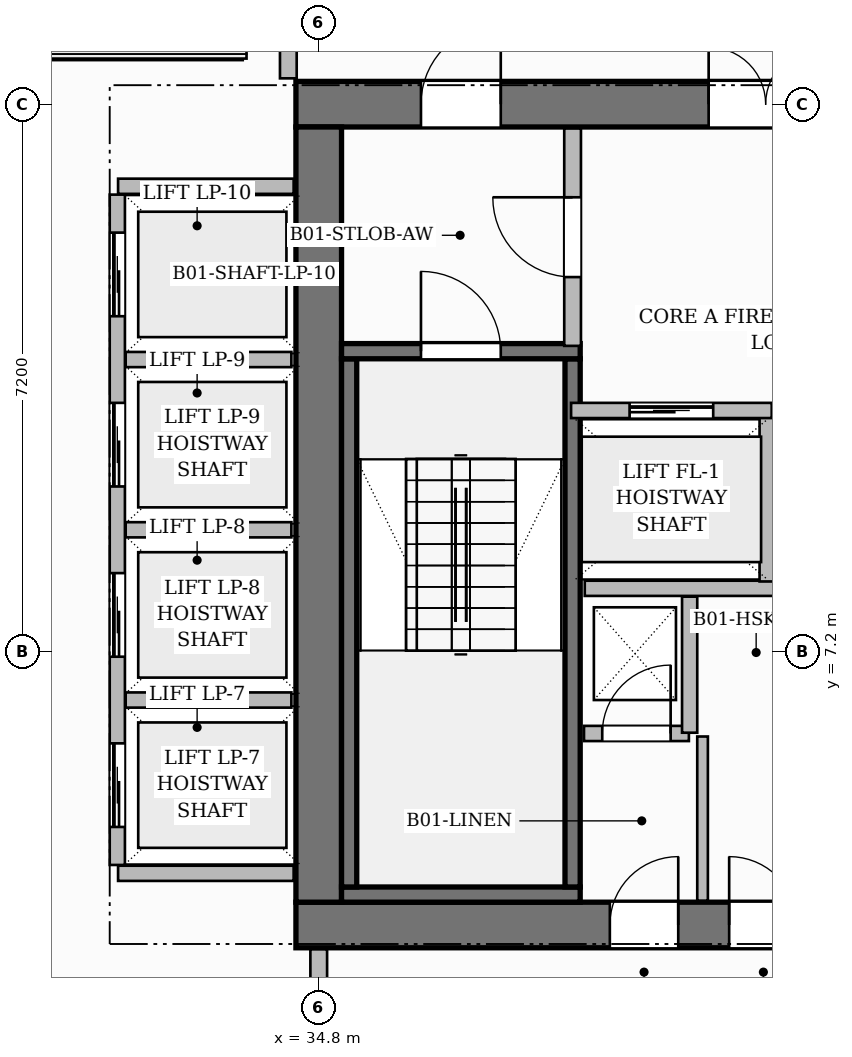
"""IFC4 building model, lengths in metres.
Left out: names, types, materials, properties, quantities, classifications, styles, units other than length and angle.
Written with IfcOpenShell. Run it as: python <this file> out.ifc"""

import sys

from ifc_helpers import new_model, si_unit, direction, frame, frame_2d, origin, place, context, subcontext, project, spatial, rectangle, extrude, source, transform, mapped, element, fill, save


model = new_model("IFC4")
c1 = context("Model", 3, precision=1e-05, world=origin(), true_north=direction((0.0, 1.0)))
c2 = subcontext(c1, "Body", "Model", "MODEL_VIEW")
j1 = project(units=[si_unit("LENGTHUNIT", "METRE"), si_unit("PLANEANGLEUNIT", "RADIAN")], contexts=[c1])
p1 = place(None, origin())
s1 = spatial("IfcSite", under=j1, at=p1, CompositionType="ELEMENT")
p2 = place(p1, origin())
s2 = spatial("IfcBuilding", under=s1, at=p2, CompositionType="ELEMENT")
p3 = place(p2, frame((0.0, 0.0, -6.5)))
s3 = spatial("IfcBuildingStorey", under=s2, at=p3, CompositionType="ELEMENT", Elevation=-6.5)
p4 = place(p3, frame((34.5, 3.6, 0.0), z_axis=(0.0, 0.0, 1.0), x_axis=(1.0, 0.0, 0.0)))
e1 = element("IfcWall", 1, at=p4, inside=s3, PredefinedType="SHEAR", context=c2, shape_type="SweptSolid", body=[
    extrude(rectangle(XDim=15.6, YDim=0.6, at=frame_2d((7.8, 0.0))), origin(), (0.0, 0.0, 1.0), 6.5),
])
p5 = place(p4, frame((4.13, 0.0, 0.0)))
e2 = element("IfcOpeningElement", 2, at=p5, cuts=e1, PredefinedType="OPENING", context=c2, shape_type="SweptSolid", body=[
    extrude(rectangle(XDim=0.9, YDim=2.1, at=frame_2d((0.45, 1.05))), frame((0.0, 0.31, 0.0), z_axis=(0.0, -1.0, 0.0), x_axis=(1.0, 0.0, 0.0)), (0.0, 0.0, 1.0), 0.62),
])
p6 = place(p4, frame((5.7, 0.0, 0.0)))
e3 = element("IfcOpeningElement", 3, at=p6, cuts=e1, PredefinedType="OPENING", context=c2, shape_type="SweptSolid", body=[
    extrude(rectangle(XDim=0.9, YDim=2.1, at=frame_2d((0.45, 1.05))), frame((0.0, 0.31, 0.0), z_axis=(0.0, -1.0, 0.0), x_axis=(1.0, 0.0, 0.0)), (0.0, 0.0, 1.0), 0.62),
])
p7 = place(p4, frame((7.3, 0.0, 0.0)))
e4 = element("IfcOpeningElement", 4, at=p7, cuts=e1, PredefinedType="OPENING", context=c2, shape_type="SweptSolid", body=[
    extrude(rectangle(XDim=0.9, YDim=2.1, at=frame_2d((0.45, 1.05))), frame((0.0, 0.31, 0.0), z_axis=(0.0, -1.0, 0.0), x_axis=(1.0, 0.0, 0.0)), (0.0, 0.0, 1.0), 0.62),
])
p8 = place(p3, frame((34.5, 14.4, 0.0), z_axis=(0.0, 0.0, 1.0), x_axis=(1.0, 0.0, 0.0)))
e5 = element("IfcWall", 5, at=p8, inside=s3, PredefinedType="SHEAR", context=c2, shape_type="SweptSolid", body=[
    extrude(rectangle(XDim=15.6, YDim=0.6, at=frame_2d((7.8, 0.0))), origin(), (0.0, 0.0, 1.0), 6.5),
])
p9 = place(p8, frame((5.43, 0.0, 0.0)))
e6 = element("IfcOpeningElement", 6, at=p9, cuts=e5, PredefinedType="OPENING", context=c2, shape_type="SweptSolid", body=[
    extrude(rectangle(XDim=1.5, YDim=2.2, at=frame_2d((0.75, 1.1))), frame((0.0, 0.31, 0.0), z_axis=(0.0, -1.0, 0.0), x_axis=(1.0, 0.0, 0.0)), (0.0, 0.0, 1.0), 0.62),
])
p10 = place(p8, frame((1.645, 0.0, 0.0)))
e7 = element("IfcOpeningElement", 7, at=p10, cuts=e5, PredefinedType="OPENING", context=c2, shape_type="SweptSolid", body=[
    extrude(rectangle(XDim=1.05, YDim=2.15, at=frame_2d((0.525, 1.075))), frame((0.0, 0.31, 0.0), z_axis=(0.0, -1.0, 0.0), x_axis=(1.0, 0.0, 0.0)), (0.0, 0.0, 1.0), 0.62),
])
p11 = place(p8, frame((11.275, 0.0, 0.0)))
e8 = element("IfcOpeningElement", 8, at=p11, cuts=e5, PredefinedType="OPENING", context=c2, shape_type="SweptSolid", body=[
    extrude(rectangle(XDim=1.05, YDim=2.15, at=frame_2d((0.525, 1.075))), frame((0.0, 0.31, 0.0), z_axis=(0.0, -1.0, 0.0), x_axis=(1.0, 0.0, 0.0)), (0.0, 0.0, 1.0), 0.62),
])
p12 = place(p3, frame((34.8, 3.9, 0.0), z_axis=(0.0, 0.0, 1.0), x_axis=(0.0, 1.0, 0.0)))
e9 = element("IfcWall", 9, at=p12, inside=s3, PredefinedType="SHEAR", context=c2, shape_type="SweptSolid", body=[
    extrude(rectangle(XDim=10.2, YDim=0.6, at=frame_2d((5.1, 0.0))), origin(), (0.0, 0.0, 1.0), 6.5),
])
p13 = place(p3, frame((35.1, 4.0, 0.0), z_axis=(0.0, 0.0, 1.0), x_axis=(1.0, 0.0, 0.0)))
e10 = element("IfcWall", 10, at=p13, inside=s3, PredefinedType="SHEAR", context=c2, shape_type="SweptSolid", body=[
    extrude(rectangle(XDim=3.14, YDim=0.2, at=frame_2d((1.57, 0.0))), origin(), (0.0, 0.0, 1.0), 6.5),
])
for number, where, z_axis, x_axis in (
    (11, (35.2, 4.1, 0.0), (0.0, 0.0, 1.0), (0.0, 1.0, 0.0)),
    (12, (38.14, 4.1, 0.0), (0.0, 0.0, 1.0), (0.0, 1.0, 0.0)),
):
    element("IfcWall", number, at=place(p3, frame(where, z_axis=z_axis, x_axis=x_axis)), inside=s3, PredefinedType="SHEAR", context=c2, shape_type="SweptSolid", body=[
        extrude(rectangle(XDim=6.95, YDim=0.2, at=frame_2d((3.475, 0.0))), origin(), (0.0, 0.0, 1.0), 6.5),
    ])
p14 = place(p3, frame((35.1, 11.15, 0.0), z_axis=(0.0, 0.0, 1.0), x_axis=(1.0, 0.0, 0.0)))
e13 = element("IfcWall", 13, at=p14, inside=s3, PredefinedType="SHEAR", context=c2, shape_type="SweptSolid", body=[
    extrude(rectangle(XDim=3.14, YDim=0.2, at=frame_2d((1.57, 0.0))), origin(), (0.0, 0.0, 1.0), 6.5),
])
p15 = place(p14, frame((1.045, 0.0, 0.0)))
e14 = element("IfcOpeningElement", 14, at=p15, cuts=e13, PredefinedType="OPENING", context=c2, shape_type="SweptSolid", body=[
    extrude(rectangle(XDim=1.05, YDim=2.2, at=frame_2d((0.525, 1.1))), frame((0.0, 0.11, 0.0), z_axis=(0.0, -1.0, 0.0), x_axis=(1.0, 0.0, 0.0)), (0.0, 0.0, 1.0), 0.22),
])
p16 = place(p3, frame((38.3, 8.03, 0.0), z_axis=(0.0, 0.0, 1.0), x_axis=(1.0, 0.0, 0.0)))
e15 = element("IfcWall", 15, at=p16, inside=s3, PredefinedType="PARTITIONING", context=c2, shape_type="SweptSolid", body=[
    extrude(rectangle(XDim=4.74, YDim=0.2, at=frame_2d((2.37, 0.0))), origin(), (0.0, 0.0, 1.0), 6.1),
])
p17 = place(p3, frame((40.7, 8.12, 0.0), z_axis=(0.0, 0.0, 1.0), x_axis=(0.0, 1.0, 0.0)))
e16 = element("IfcWall", 16, at=p17, inside=s3, PredefinedType="PARTITIONING", context=c2, shape_type="SweptSolid", body=[
    extrude(rectangle(XDim=2.18, YDim=0.2, at=frame_2d((1.09, 0.0))), origin(), (0.0, 0.0, 1.0), 6.1),
])
p18 = place(p3, frame((38.14, 11.22, 0.0), z_axis=(0.0, 0.0, 1.0), x_axis=(0.0, 1.0, 0.0)))
e17 = element("IfcWall", 17, at=p18, inside=s3, PredefinedType="PARTITIONING", context=c2, shape_type="SweptSolid", body=[
    extrude(rectangle(XDim=2.86, YDim=0.22, at=frame_2d((1.43, 0.0))), origin(), (0.0, 0.0, 1.0), 6.1),
])
p19 = place(p18, frame((0.905, 0.0, 0.0)))
e18 = element("IfcOpeningElement", 18, at=p19, cuts=e17, PredefinedType="OPENING", context=c2, shape_type="SweptSolid", body=[
    extrude(rectangle(XDim=1.05, YDim=2.15, at=frame_2d((0.525, 1.075))), frame((0.0, 0.12, 0.0), z_axis=(0.0, -1.0, 0.0), x_axis=(1.0, 0.0, 0.0)), (0.0, 0.0, 1.0), 0.24),
])
p20 = place(p3, frame((38.29, 6.12, 0.0), z_axis=(0.0, 0.0, 1.0), x_axis=(1.0, 0.0, 0.0)))
e19 = element("IfcWall", 19, at=p20, inside=s3, PredefinedType="PARTITIONING", context=c2, shape_type="SweptSolid", body=[
    extrude(rectangle(XDim=1.38, YDim=0.2, at=frame_2d((0.69, 0.0))), origin(), (0.0, 0.0, 1.0), 6.1),
])
p21 = place(p20, frame((0.24, 0.0, 0.0)))
e20 = element("IfcOpeningElement", 20, at=p21, cuts=e19, PredefinedType="OPENING", context=c2, shape_type="SweptSolid", body=[
    extrude(rectangle(XDim=0.9, YDim=2.1, at=frame_2d((0.45, 1.05))), frame((0.0, 0.11, 0.0), z_axis=(0.0, -1.0, 0.0), x_axis=(1.0, 0.0, 0.0)), (0.0, 0.0, 1.0), 0.22),
])
p22 = place(p3, frame((39.68, 6.13, 0.0), z_axis=(0.0, 0.0, 1.0), x_axis=(0.0, 1.0, 0.0)))
e21 = element("IfcWall", 21, at=p22, inside=s3, PredefinedType="PARTITIONING", context=c2, shape_type="SweptSolid", body=[
    extrude(rectangle(XDim=1.79, YDim=0.2, at=frame_2d((0.895, 0.0))), origin(), (0.0, 0.0, 1.0), 6.1),
])
p23 = place(p3, frame((39.85, 3.92, 0.0), z_axis=(0.0, 0.0, 1.0), x_axis=(0.0, 1.0, 0.0)))
e22 = element("IfcWall", 22, at=p23, inside=s3, PredefinedType="PARTITIONING", context=c2, shape_type="SweptSolid", body=[
    extrude(rectangle(XDim=2.16, YDim=0.14, at=frame_2d((1.08, 0.0))), origin(), (0.0, 0.0, 1.0), 6.1),
])
for number, where, z_axis, x_axis in (
    (23, (32.16, 4.28, 0.0), (0.0, 0.0, 1.0), (1.0, 0.0, 0.0)),
    (24, (32.16, 13.32, 0.0), (0.0, 0.0, 1.0), (1.0, 0.0, 0.0)),
):
    element("IfcWall", number, at=place(p3, frame(where, z_axis=z_axis, x_axis=x_axis)), inside=s3, PredefinedType="PARTITIONING", context=c2, shape_type="SweptSolid", body=[
        extrude(rectangle(XDim=2.31, YDim=0.2, at=frame_2d((1.155, 0.0))), origin(), (0.0, 0.0, 1.0), 6.1),
    ])
p24 = place(p3, frame((32.15, 4.39, 0.0), z_axis=(0.0, 0.0, 1.0), x_axis=(0.0, 1.0, 0.0)))
e25 = element("IfcWall", 25, at=p24, inside=s3, PredefinedType="PARTITIONING", context=c2, shape_type="SweptSolid", body=[
    extrude(rectangle(XDim=8.82, YDim=0.2, at=frame_2d((4.41, 0.0))), origin(), (0.0, 0.0, 1.0), 5.335),
])
p25 = place(p24, frame((0.5, 0.0, 0.0)))
e26 = element("IfcOpeningElement", 26, at=p25, cuts=e25, PredefinedType="OPENING", context=c2, shape_type="SweptSolid", body=[
    extrude(rectangle(XDim=1.1, YDim=2.2, at=frame_2d((0.55, 1.1))), frame((0.0, 0.11, 0.0), z_axis=(0.0, -1.0, 0.0), x_axis=(1.0, 0.0, 0.0)), (0.0, 0.0, 1.0), 0.22),
])
p26 = place(p24, frame((2.74, 0.0, 0.0)))
e27 = element("IfcOpeningElement", 27, at=p26, cuts=e25, PredefinedType="OPENING", context=c2, shape_type="SweptSolid", body=[
    extrude(rectangle(XDim=1.1, YDim=2.2, at=frame_2d((0.55, 1.1))), frame((0.0, 0.11, 0.0), z_axis=(0.0, -1.0, 0.0), x_axis=(1.0, 0.0, 0.0)), (0.0, 0.0, 1.0), 0.22),
])
p27 = place(p24, frame((4.98, 0.0, 0.0)))
e28 = element("IfcOpeningElement", 28, at=p27, cuts=e25, PredefinedType="OPENING", context=c2, shape_type="SweptSolid", body=[
    extrude(rectangle(XDim=1.1, YDim=2.2, at=frame_2d((0.55, 1.1))), frame((0.0, 0.11, 0.0), z_axis=(0.0, -1.0, 0.0), x_axis=(1.0, 0.0, 0.0)), (0.0, 0.0, 1.0), 0.22),
])
p28 = place(p24, frame((7.22, 0.0, 0.0)))
e29 = element("IfcOpeningElement", 29, at=p28, cuts=e25, PredefinedType="OPENING", context=c2, shape_type="SweptSolid", body=[
    extrude(rectangle(XDim=1.1, YDim=2.2, at=frame_2d((0.55, 1.1))), frame((0.0, 0.11, 0.0), z_axis=(0.0, -1.0, 0.0), x_axis=(1.0, 0.0, 0.0)), (0.0, 0.0, 1.0), 0.22),
])
for number, where, z_axis, x_axis in (
    (30, (32.26, 6.56, 0.0), (0.0, 0.0, 1.0), (1.0, 0.0, 0.0)),
    (31, (32.26, 8.8, 0.0), (0.0, 0.0, 1.0), (1.0, 0.0, 0.0)),
    (32, (32.26, 11.04, 0.0), (0.0, 0.0, 1.0), (1.0, 0.0, 0.0)),
):
    element("IfcWall", number, at=place(p3, frame(where, z_axis=z_axis, x_axis=x_axis)), inside=s3, PredefinedType="PARTITIONING", context=c2, shape_type="SweptSolid", body=[
        extrude(rectangle(XDim=2.18, YDim=0.2, at=frame_2d((1.09, 0.0))), origin(), (0.0, 0.0, 1.0), 6.1),
    ])
p29 = place(p3, frame((34.4, 14.74, 0.0), z_axis=(0.0, 0.0, 1.0), x_axis=(0.0, 1.0, 0.0)))
e33 = element("IfcWall", 33, at=p29, inside=s3, PredefinedType="PARTITIONING", context=c2, shape_type="SweptSolid", body=[
    extrude(rectangle(XDim=6.72, YDim=0.22, at=frame_2d((3.36, 0.0))), origin(), (0.0, 0.0, 1.0), 5.185),
])
p30 = place(p29, frame((1.35, 0.0, 0.0)))
e34 = element("IfcOpeningElement", 34, at=p30, cuts=e33, PredefinedType="OPENING", context=c2, shape_type="SweptSolid", body=[
    extrude(rectangle(XDim=4.0, YDim=3.2, at=frame_2d((2.0, 1.6))), frame((0.0, 0.12, 0.0), z_axis=(0.0, -1.0, 0.0), x_axis=(1.0, 0.0, 0.0)), (0.0, 0.0, 1.0), 0.24),
])
p31 = place(p3, frame((34.8, 0.37, 0.0), z_axis=(0.0, 0.0, 1.0), x_axis=(0.0, 1.0, 0.0)))
e35 = element("IfcWall", 35, at=p31, inside=s3, PredefinedType="PARTITIONING", context=c2, shape_type="SweptSolid", body=[
    extrude(rectangle(XDim=2.91, YDim=0.22, at=frame_2d((1.455, 0.0))), origin(), (0.0, 0.0, 1.0), 6.1),
])
p32 = place(p31, frame((0.905, 0.0, 0.0)))
e36 = element("IfcOpeningElement", 36, at=p32, cuts=e35, PredefinedType="OPENING", context=c2, shape_type="SweptSolid", body=[
    extrude(rectangle(XDim=1.05, YDim=2.15, at=frame_2d((0.525, 1.075))), frame((0.0, 0.12, 0.0), z_axis=(0.0, -1.0, 0.0), x_axis=(1.0, 0.0, 0.0)), (0.0, 0.0, 1.0), 0.24),
])
p33 = place(p3, frame((38.12, 10.37, 0.0), z_axis=(0.0, 0.0, 1.0), x_axis=(1.0, 0.0, 0.0)))
e37 = element("IfcWall", 37, at=p33, inside=s3, PredefinedType="PARTITIONING", context=c2, shape_type="SweptSolid", body=[
    extrude(rectangle(XDim=2.64, YDim=0.2, at=frame_2d((1.32, 0.0))), origin(), (0.0, 0.0, 1.0), 6.1),
])
p34 = place(p33, frame((0.77, 0.0, 0.0)))
e38 = element("IfcOpeningElement", 38, at=p34, cuts=e37, PredefinedType="OPENING", context=c2, shape_type="SweptSolid", body=[
    extrude(rectangle(XDim=1.1, YDim=2.2, at=frame_2d((0.55, 1.1))), frame((0.0, 0.11, 0.0), z_axis=(0.0, -1.0, 0.0), x_axis=(1.0, 0.0, 0.0)), (0.0, 0.0, 1.0), 0.22),
])
m1 = source(origin(), c2, "Body", "SweptSolid", [
    extrude(rectangle(XDim=1.05, YDim=2.2, at=frame_2d((0.525, 1.1))), frame((0.0, 0.025, 0.0), z_axis=(0.0, -1.0, 0.0), x_axis=(1.0, 0.0, 0.0)), (0.0, 0.0, 1.0), 0.05),
])
p35 = place(p15, origin())
e39 = element("IfcDoor", 39, at=p35, inside=s3, OperationType="SINGLE_SWING_LEFT", PredefinedType="DOOR", context=c2, shape_type="MappedRepresentation", body=[
    mapped(m1, transform((0.0, 0.0, 0.0), scale=1.0)),
])
fill(e14, e39)
m2 = source(origin(), c2, "Body", "SweptSolid", [
    extrude(rectangle(XDim=1.05, YDim=2.15, at=frame_2d((0.525, 1.075))), frame((0.0, 0.025, 0.0), z_axis=(0.0, -1.0, 0.0), x_axis=(1.0, 0.0, 0.0)), (0.0, 0.0, 1.0), 0.05),
])
p36 = place(p19, origin())
e40 = element("IfcDoor", 40, at=p36, inside=s3, OperationType="SINGLE_SWING_RIGHT", PredefinedType="DOOR", context=c2, shape_type="MappedRepresentation", body=[
    mapped(m2, transform((0.0, 0.0, 0.0), scale=1.0)),
])
fill(e18, e40)
m3 = source(origin(), c2, "Body", "SweptSolid", [
    extrude(rectangle(XDim=1.5, YDim=2.2, at=frame_2d((0.75, 1.1))), frame((0.0, 0.025, 0.0), z_axis=(0.0, -1.0, 0.0), x_axis=(1.0, 0.0, 0.0)), (0.0, 0.0, 1.0), 0.05),
])
p37 = place(p9, origin())
e41 = element("IfcDoor", 41, at=p37, inside=s3, OperationType="DOUBLE_DOOR_SINGLE_SWING", PredefinedType="DOOR", context=c2, shape_type="MappedRepresentation", body=[
    mapped(m3, transform((0.0, 0.0, 0.0), scale=1.0)),
])
fill(e6, e41)
p38 = place(p10, origin())
e42 = element("IfcDoor", 42, at=p38, inside=s3, OperationType="SINGLE_SWING_RIGHT", PredefinedType="DOOR", context=c2, shape_type="MappedRepresentation", body=[
    mapped(m2, transform((0.0, 0.0, 0.0), scale=1.0)),
])
fill(e7, e42)
m4 = source(origin(), c2, "Body", "SweptSolid", [
    extrude(rectangle(XDim=0.9, YDim=2.1, at=frame_2d((0.45, 1.05))), frame((0.0, 0.025, 0.0), z_axis=(0.0, -1.0, 0.0), x_axis=(1.0, 0.0, 0.0)), (0.0, 0.0, 1.0), 0.05),
])
p39 = place(p21, origin())
e43 = element("IfcDoor", 43, at=p39, inside=s3, OperationType="SINGLE_SWING_RIGHT", PredefinedType="DOOR", context=c2, shape_type="MappedRepresentation", body=[
    mapped(m4, transform((0.0, 0.0, 0.0), scale=1.0)),
])
fill(e20, e43)
p40 = place(p5, origin())
e44 = element("IfcDoor", 44, at=p40, inside=s3, OperationType="SINGLE_SWING_RIGHT", PredefinedType="DOOR", context=c2, shape_type="MappedRepresentation", body=[
    mapped(m4, transform((0.0, 0.0, 0.0), scale=1.0)),
])
fill(e2, e44)
p41 = place(p6, origin())
e45 = element("IfcDoor", 45, at=p41, inside=s3, OperationType="SINGLE_SWING_LEFT", PredefinedType="DOOR", context=c2, shape_type="MappedRepresentation", body=[
    mapped(m4, transform((0.0, 0.0, 0.0), scale=1.0)),
])
fill(e3, e45)
m5 = source(origin(), c2, "Body", "SweptSolid", [
    extrude(rectangle(XDim=1.1, YDim=2.2, at=frame_2d((0.55, 1.1))), frame((0.0, 0.025, 0.0), z_axis=(0.0, -1.0, 0.0), x_axis=(1.0, 0.0, 0.0)), (0.0, 0.0, 1.0), 0.05),
])
p42 = place(p34, origin())
e46 = element("IfcDoor", 46, at=p42, inside=s3, OperationType="SLIDING_TO_LEFT", PredefinedType="DOOR", context=c2, shape_type="MappedRepresentation", body=[
    mapped(m5, transform((0.0, 0.0, 0.0), scale=1.0)),
])
fill(e38, e46)
p43 = place(p25, origin())
e47 = element("IfcDoor", 47, at=p43, inside=s3, OperationType="SLIDING_TO_LEFT", PredefinedType="DOOR", context=c2, shape_type="MappedRepresentation", body=[
    mapped(m5, transform((0.0, 0.0, 0.0), scale=1.0)),
])
fill(e26, e47)
p44 = place(p26, origin())
e48 = element("IfcDoor", 48, at=p44, inside=s3, OperationType="SLIDING_TO_LEFT", PredefinedType="DOOR", context=c2, shape_type="MappedRepresentation", body=[
    mapped(m5, transform((0.0, 0.0, 0.0), scale=1.0)),
])
fill(e27, e48)
p45 = place(p27, origin())
e49 = element("IfcDoor", 49, at=p45, inside=s3, OperationType="SLIDING_TO_LEFT", PredefinedType="DOOR", context=c2, shape_type="MappedRepresentation", body=[
    mapped(m5, transform((0.0, 0.0, 0.0), scale=1.0)),
])
fill(e28, e49)
p46 = place(p28, origin())
e50 = element("IfcDoor", 50, at=p46, inside=s3, OperationType="SLIDING_TO_LEFT", PredefinedType="DOOR", context=c2, shape_type="MappedRepresentation", body=[
    mapped(m5, transform((0.0, 0.0, 0.0), scale=1.0)),
])
fill(e29, e50)
save(model, sys.argv[1])
